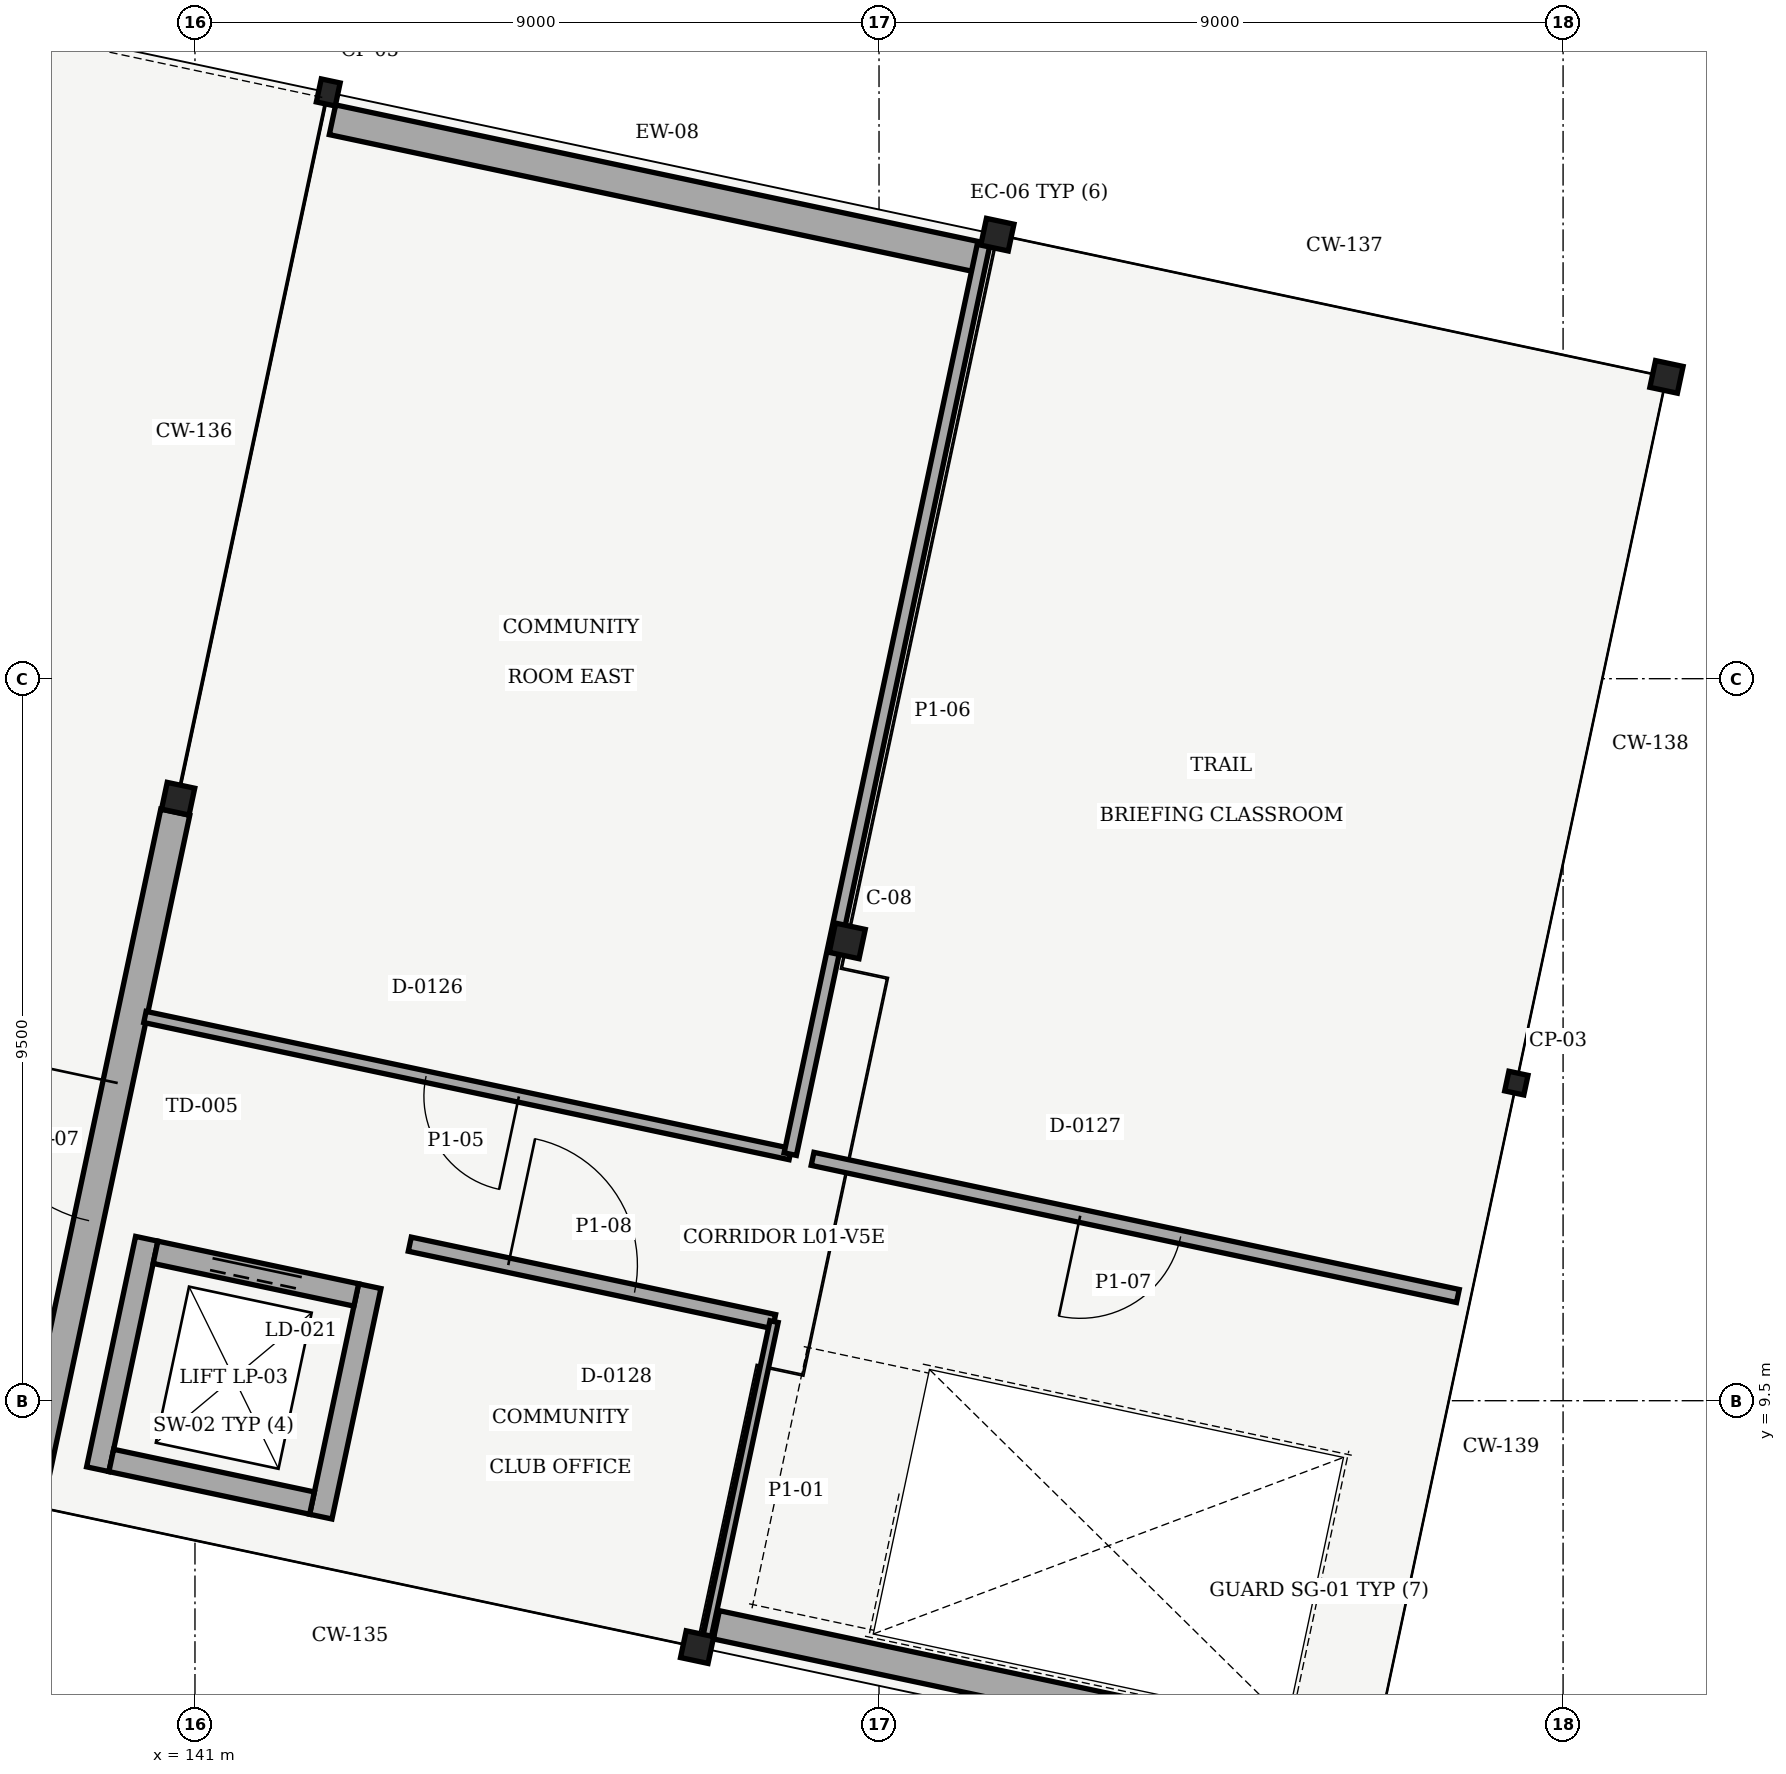
"""IFC4 building model, lengths in metres.
Left out: names, types, materials, properties, quantities, classifications, styles, units other than length and angle.
Written with IfcOpenShell. Run it as: python <this file> out.ifc"""

import sys

from ifc_helpers import new_model, si_unit, direction, frame, frame_2d, origin, origin_with_axes, origin_2d, place, context, subcontext, project, spatial, rectangle, i_section, extrude, element, fill, save


model = new_model("IFC4")
c1 = context("Model", 3, precision=1e-05, world=origin(), true_north=direction((0.0, 1.0)))
c2 = subcontext(c1, "Body", "Model", "MODEL_VIEW")
j1 = project(units=[si_unit("LENGTHUNIT", "METRE"), si_unit("PLANEANGLEUNIT", "RADIAN")], contexts=[c1])
p1 = place(None, origin())
s1 = spatial("IfcSite", under=j1, at=p1, CompositionType="ELEMENT")
p2 = place(p1, origin())
s2 = spatial("IfcBuilding", under=s1, at=p2, CompositionType="ELEMENT")
p3 = place(p2, frame((0.0, 0.0, 4.8)))
s3 = spatial("IfcBuildingStorey", under=s2, at=p3, CompositionType="ELEMENT", Elevation=4.8)
p4 = place(p3, frame((140.779, 17.421, 0.0), z_axis=(0.0, 0.0, 1.0), x_axis=(0.978147600734, -0.207911690818, 0.0)))
e1 = element("IfcColumn", 1, at=p4, inside=s3, PredefinedType="COLUMN", context=c2, shape_type="SweptSolid", body=[
    extrude(i_section(OverallWidth=0.37, OverallDepth=0.36, WebThickness=0.012, FlangeThickness=0.02, FilletRadius=0.015, at=origin_2d()), origin(), (0.0, 0.0, 1.0), 4.8),
])
p5 = place(p3, frame((142.754, 26.714, 0.0), z_axis=(0.0, 0.0, 1.0), x_axis=(0.978147600734, -0.207911690818, 0.0)))
e2 = element("IfcColumn", 2, at=p5, inside=s3, PredefinedType="PILASTER", context=c2, shape_type="SweptSolid", body=[
    extrude(i_section(OverallWidth=0.254, OverallDepth=0.31, WebThickness=0.009, FlangeThickness=0.016, FilletRadius=0.011, at=origin_2d()), origin(), (0.0, 0.0, 1.0), 4.8),
])
p6 = place(p3, frame((147.607, 6.258, 0.0), z_axis=(0.0, 0.0, 1.0), x_axis=(0.978147600734, -0.207911690818, 0.0)))
e3 = element("IfcColumn", 3, at=p6, inside=s3, PredefinedType="COLUMN", context=c2, shape_type="SweptSolid", body=[
    extrude(i_section(OverallWidth=0.37, OverallDepth=0.36, WebThickness=0.012, FlangeThickness=0.02, FilletRadius=0.015, at=origin_2d()), origin(), (0.0, 0.0, 1.0), 4.8),
])
p7 = place(p3, frame((149.582, 15.55, 0.0), z_axis=(0.0, 0.0, 1.0), x_axis=(0.978147600734, -0.207911690818, 0.0)))
e4 = element("IfcColumn", 4, at=p7, inside=s3, PredefinedType="COLUMN", context=c2, shape_type="SweptSolid", body=[
    extrude(i_section(OverallWidth=0.401, OverallDepth=0.394, WebThickness=0.023, FlangeThickness=0.037, FilletRadius=0.015, at=origin_2d()), origin(), (0.0, 0.0, 1.0), 4.8),
])
p8 = place(p3, frame((151.557, 24.842, 0.0), z_axis=(0.0, 0.0, 1.0), x_axis=(0.978147600734, -0.207911690818, 0.0)))
e5 = element("IfcColumn", 5, at=p8, inside=s3, PredefinedType="COLUMN", context=c2, shape_type="SweptSolid", body=[
    extrude(i_section(OverallWidth=0.37, OverallDepth=0.36, WebThickness=0.012, FlangeThickness=0.02, FilletRadius=0.015, at=origin_2d()), origin(), (0.0, 0.0, 1.0), 4.8),
])
p9 = place(p3, frame((158.385, 13.679, 0.0), z_axis=(0.0, 0.0, 1.0), x_axis=(0.978147600734, -0.207911690818, 0.0)))
e6 = element("IfcColumn", 6, at=p9, inside=s3, PredefinedType="PILASTER", context=c2, shape_type="SweptSolid", body=[
    extrude(i_section(OverallWidth=0.257, OverallDepth=0.264, WebThickness=0.012, FlangeThickness=0.02, FilletRadius=0.009, at=origin_2d()), origin(), (0.0, 0.0, 1.0), 4.8),
])
p10 = place(p3, frame((160.36, 22.971, 0.0), z_axis=(0.0, 0.0, 1.0), x_axis=(0.978147600734, -0.207911690818, 0.0)))
e7 = element("IfcColumn", 7, at=p10, inside=s3, PredefinedType="COLUMN", context=c2, shape_type="SweptSolid", body=[
    extrude(i_section(OverallWidth=0.37, OverallDepth=0.36, WebThickness=0.012, FlangeThickness=0.02, FilletRadius=0.015, at=origin_2d()), origin(), (0.0, 0.0, 1.0), 4.8),
])
p11 = place(p3, frame((156.298, 4.758, 0.0), z_axis=(0.0, 0.0, 1.0), x_axis=(-0.978147340401, 0.207912915584, 0.0)))
e8 = element("IfcWall", 8, at=p11, inside=s3, PredefinedType="SOLIDWALL", context=c2, shape_type="SweptSolid", body=[
    extrude(rectangle(XDim=8.626, YDim=0.38, at=frame_2d((4.313, 0.0))), origin(), (0.0, 0.0, 1.0), 3.4),
])
p12 = place(p3, frame((138.841, 8.307, 0.0), z_axis=(0.0, 0.0, 1.0), x_axis=(0.207931944956, 0.978143295365, 0.0)))
e9 = element("IfcWall", 9, at=p12, inside=s3, PredefinedType="SOLIDWALL", context=c2, shape_type="SweptSolid", body=[
    extrude(rectangle(XDim=9.136, YDim=0.39, at=frame_2d((4.568, 0.0))), origin(), (0.0, 0.0, 1.0), 3.4),
])
p13 = place(p12, frame((3.643, 0.0, 0.0)))
e10 = element("IfcOpeningElement", 10, at=p13, cuts=e9, PredefinedType="OPENING", context=c2, shape_type="SweptSolid", body=[
    extrude(rectangle(XDim=1.85, YDim=2.2, at=frame_2d((0.925, 1.1))), frame((0.0, 0.205, 0.0), z_axis=(0.0, -1.0, 0.0), x_axis=(1.0, 0.0, 0.0)), (0.0, 0.0, 1.0), 0.41),
])
p14 = place(p3, frame((142.809, 26.354, 0.0), z_axis=(0.0, 0.0, 1.0), x_axis=(0.978144630188, -0.207925665647, 0.0)))
e11 = element("IfcWall", 11, at=p14, inside=s3, PredefinedType="SOLIDWALL", context=c2, shape_type="SweptSolid", body=[
    extrude(rectangle(XDim=8.684, YDim=0.4, at=frame_2d((4.342, 0.0))), origin(), (0.0, 0.0, 1.0), 3.4),
])
p15 = place(p3, frame((139.721, 8.598, 0.0), z_axis=(0.0, 0.0, 1.0), x_axis=(0.207899254824, 0.978150244003, 0.0)))
e12 = element("IfcWall", 12, at=p15, inside=s3, PredefinedType="SHEAR", context=c2, shape_type="SweptSolid", body=[
    extrude(rectangle(XDim=3.1, YDim=0.3, at=frame_2d((1.55, 0.0))), origin(), (0.0, 0.0, 1.0), 4.54),
])
p16 = place(p3, frame((142.656, 7.975, 0.0), z_axis=(0.0, 0.0, 1.0), x_axis=(0.207915270313, 0.978146839882, 0.0)))
e13 = element("IfcWall", 13, at=p16, inside=s3, PredefinedType="SHEAR", context=c2, shape_type="SweptSolid", body=[
    extrude(rectangle(XDim=3.1, YDim=0.3, at=frame_2d((1.55, 0.0))), origin(), (0.0, 0.0, 1.0), 4.54),
])
p17 = place(p3, frame((139.899, 8.714, 0.0), z_axis=(0.0, 0.0, 1.0), x_axis=(0.978133334052, -0.207978798957, 0.0)))
e14 = element("IfcWall", 14, at=p17, inside=s3, PredefinedType="SHEAR", context=c2, shape_type="SweptSolid", body=[
    extrude(rectangle(XDim=2.7, YDim=0.3, at=frame_2d((1.35, 0.0))), origin(), (0.0, 0.0, 1.0), 4.54),
])
p18 = place(p3, frame((140.481, 11.453, 0.0), z_axis=(0.0, 0.0, 1.0), x_axis=(0.97815563361, -0.207873895514, 0.0)))
e15 = element("IfcWall", 15, at=p18, inside=s3, PredefinedType="SHEAR", context=c2, shape_type="SweptSolid", body=[
    extrude(rectangle(XDim=2.7, YDim=0.3, at=frame_2d((1.35, 0.0))), origin(), (0.0, 0.0, 1.0), 4.54),
])
p19 = place(p18, frame((0.75, 0.0, 0.0)))
e16 = element("IfcOpeningElement", 16, at=p19, cuts=e15, PredefinedType="OPENING", context=c2, shape_type="SweptSolid", body=[
    extrude(rectangle(XDim=1.2, YDim=2.15, at=frame_2d((0.6, 1.075))), frame((0.0, 0.16, 0.0), z_axis=(0.0, -1.0, 0.0), x_axis=(1.0, 0.0, 0.0)), (0.0, 0.0, 1.0), 0.32),
])
p20 = place(p3, frame((148.832, 12.745, 0.0), z_axis=(0.0, 0.0, 1.0), x_axis=(-0.978146839882, 0.207915270313, 0.0)))
e17 = element("IfcWall", 17, at=p20, inside=s3, PredefinedType="PARTITIONING", context=c2, shape_type="SweptSolid", body=[
    extrude(rectangle(XDim=8.68, YDim=0.15, at=frame_2d((4.34, 0.0))), origin(), (0.0, 0.0, 1.0), 3.38),
])
p21 = place(p20, frame((3.65, 0.0, 0.0)))
e18 = element("IfcOpeningElement", 18, at=p21, cuts=e17, PredefinedType="OPENING", context=c2, shape_type="SweptSolid", body=[
    extrude(rectangle(XDim=1.25, YDim=2.15, at=frame_2d((0.625, 1.075))), frame((0.0, 0.085, 0.0), z_axis=(0.0, -1.0, 0.0), x_axis=(1.0, 0.0, 0.0)), (0.0, 0.0, 1.0), 0.17),
])
p22 = place(p3, frame((151.375, 24.707, 0.0), z_axis=(0.0, 0.0, 1.0), x_axis=(-0.207929664169, -0.978143780207, 0.0)))
e19 = element("IfcWall", 19, at=p22, inside=s3, PredefinedType="PARTITIONING", context=c2, shape_type="SweptSolid", body=[
    extrude(rectangle(XDim=12.23, YDim=0.165, at=frame_2d((6.115, 0.0))), origin(), (0.0, 0.0, 1.0), 3.38),
])
p23 = place(p3, frame((157.616, 10.877, 0.0), z_axis=(0.0, 0.0, 1.0), x_axis=(-0.97814805573, 0.207909550219, 0.0)))
e20 = element("IfcWall", 20, at=p23, inside=s3, PredefinedType="PARTITIONING", context=c2, shape_type="SweptSolid", body=[
    extrude(rectangle(XDim=8.68, YDim=0.175, at=frame_2d((4.34, 0.0))), origin(), (0.0, 0.0, 1.0), 3.38),
])
p24 = place(p23, frame((3.73, 0.0, 0.0)))
e21 = element("IfcOpeningElement", 21, at=p24, cuts=e20, PredefinedType="OPENING", context=c2, shape_type="SweptSolid", body=[
    extrude(rectangle(XDim=1.35, YDim=2.2, at=frame_2d((0.675, 1.1))), frame((0.0, 0.098, 0.0), z_axis=(0.0, -1.0, 0.0), x_axis=(1.0, 0.0, 0.0)), (0.0, 0.0, 1.0), 0.195),
])
p25 = place(p3, frame((143.826, 11.559, 0.0), z_axis=(0.0, 0.0, 1.0), x_axis=(0.978146693029, -0.207915961186, 0.0)))
e22 = element("IfcWall", 22, at=p25, inside=s3, PredefinedType="PARTITIONING", context=c2, shape_type="SweptSolid", body=[
    extrude(rectangle(XDim=4.9, YDim=0.19, at=frame_2d((2.45, 0.0))), origin(), (0.0, 0.0, 1.0), 3.38),
])
p26 = place(p25, frame((1.324, 0.0, 0.0)))
e23 = element("IfcOpeningElement", 23, at=p26, cuts=e22, PredefinedType="OPENING", context=c2, shape_type="SweptSolid", body=[
    extrude(rectangle(XDim=1.7, YDim=2.2, at=frame_2d((0.85, 1.1))), frame((0.0, 0.105, 0.0), z_axis=(0.0, -1.0, 0.0), x_axis=(1.0, 0.0, 0.0)), (0.0, 0.0, 1.0), 0.21),
])
p27 = place(p3, frame((148.619, 10.541, 0.0), z_axis=(0.0, 0.0, 1.0), x_axis=(-0.207956086708, -0.978138163043, 0.0)))
e24 = element("IfcWall", 24, at=p27, inside=s3, PredefinedType="PARTITIONING", context=c2, shape_type="SweptSolid", body=[
    extrude(rectangle(XDim=4.23, YDim=0.11, at=frame_2d((2.115, 0.0))), origin(), (0.0, 0.0, 1.0), 3.38),
])
p28 = place(p13, origin_with_axes())
e25 = element("IfcDoor", 25, at=p28, inside=s3, OperationType="SINGLE_SWING_RIGHT", PredefinedType="DOOR", context=c2, shape_type="SweptSolid", body=[
    extrude(rectangle(XDim=1.85, YDim=2.2, at=frame_2d((0.925, 1.1))), frame((0.0, 0.025, 0.0), z_axis=(0.0, -1.0, 0.0), x_axis=(1.0, 0.0, 0.0)), (0.0, 0.0, 1.0), 0.05),
])
fill(e10, e25)
p29 = place(p19, origin_with_axes())
e26 = element("IfcDoor", 26, at=p29, inside=s3, OperationType="DOUBLE_DOOR_SLIDING", PredefinedType="DOOR", context=c2, shape_type="SweptSolid", body=[
    extrude(rectangle(XDim=1.2, YDim=2.15, at=frame_2d((0.6, 1.075))), frame((0.0, 0.025, 0.0), z_axis=(0.0, -1.0, 0.0), x_axis=(1.0, 0.0, 0.0)), (0.0, 0.0, 1.0), 0.05),
])
fill(e16, e26)
p30 = place(p21, origin_with_axes())
e27 = element("IfcDoor", 27, at=p30, inside=s3, OperationType="SINGLE_SWING_LEFT", PredefinedType="DOOR", context=c2, shape_type="SweptSolid", body=[
    extrude(rectangle(XDim=1.25, YDim=2.15, at=frame_2d((0.625, 1.075))), frame((0.0, 0.025, 0.0), z_axis=(0.0, -1.0, 0.0), x_axis=(1.0, 0.0, 0.0)), (0.0, 0.0, 1.0), 0.05),
])
fill(e18, e27)
p31 = place(p24, origin_with_axes())
e28 = element("IfcDoor", 28, at=p31, inside=s3, OperationType="SINGLE_SWING_RIGHT", PredefinedType="DOOR", context=c2, shape_type="SweptSolid", body=[
    extrude(rectangle(XDim=1.35, YDim=2.2, at=frame_2d((0.675, 1.1))), frame((0.0, 0.025, 0.0), z_axis=(0.0, -1.0, 0.0), x_axis=(1.0, 0.0, 0.0)), (0.0, 0.0, 1.0), 0.05),
])
fill(e21, e28)
p32 = place(p26, origin_with_axes())
e29 = element("IfcDoor", 29, at=p32, inside=s3, OperationType="DOUBLE_DOOR_SINGLE_SWING", PredefinedType="DOOR", context=c2, shape_type="SweptSolid", body=[
    extrude(rectangle(XDim=1.7, YDim=2.2, at=frame_2d((0.85, 1.1))), frame((0.0, 0.025, 0.0), z_axis=(0.0, -1.0, 0.0), x_axis=(1.0, 0.0, 0.0)), (0.0, 0.0, 1.0), 0.05),
])
fill(e23, e29)
save(model, sys.argv[1])
